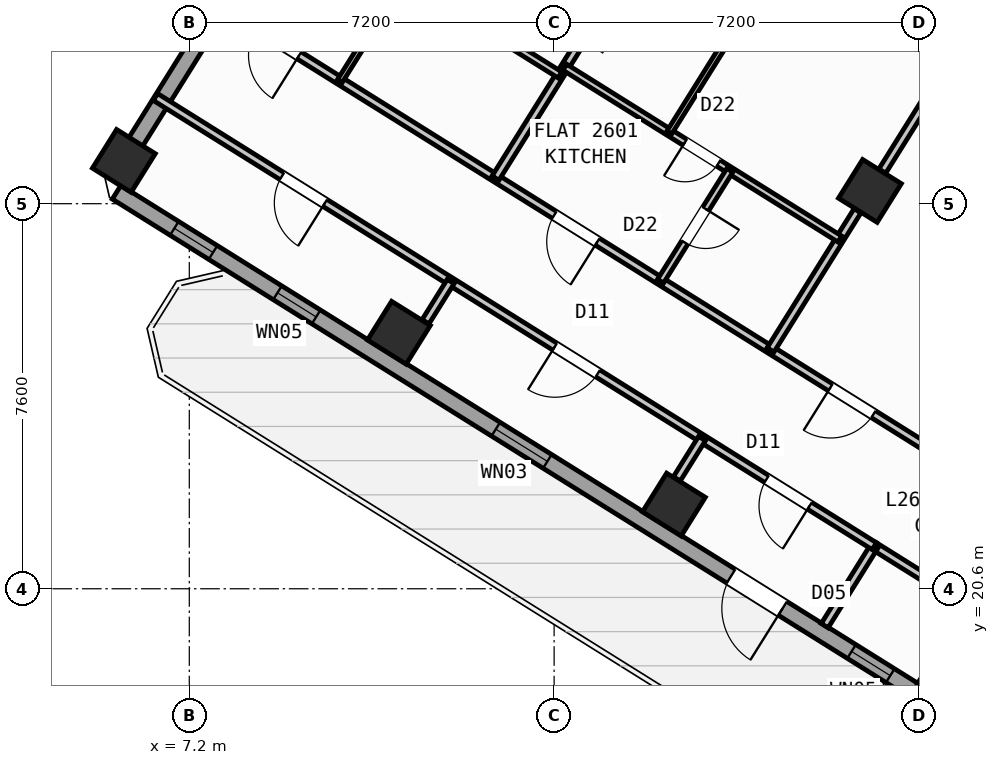
"""IFC4 building model, lengths in metres.
Left out: names, types, materials, properties, quantities, classifications, styles, units other than length and angle.
Written with IfcOpenShell. Run it as: python <this file> out.ifc"""

import sys

from ifc_helpers import new_model, si_unit, direction, frame, frame_2d, origin, origin_2d, place, context, subcontext, project, spatial, rectangle, hollow_rectangle, extrude, source, transform, mapped, element, fill, save


model = new_model("IFC4")
c1 = context("Model", 3, precision=1e-05, world=origin(), true_north=direction((0.0, 1.0)))
c2 = subcontext(c1, "Body", "Model", "MODEL_VIEW")
j1 = project(units=[si_unit("LENGTHUNIT", "METRE"), si_unit("PLANEANGLEUNIT", "RADIAN")], contexts=[c1])
p1 = place(None, origin())
s1 = spatial("IfcSite", under=j1, at=p1, CompositionType="ELEMENT")
p2 = place(p1, origin())
s2 = spatial("IfcBuilding", under=s1, at=p2, CompositionType="ELEMENT")
p3 = place(p2, frame((0.0, 0.0, 105.3)))
s3 = spatial("IfcBuildingStorey", under=s2, at=p3, CompositionType="ELEMENT", Elevation=105.3)
m1 = source(origin(), c2, "Body", "SweptSolid", [
    extrude(hollow_rectangle(XDim=0.9, YDim=0.9, WallThickness=0.036, at=origin_2d()), origin(), (0.0, 0.0, 1.0), 3.6),
])
for number, where, z_axis, x_axis in (
    (1, (22.191, 18.87, 0.0), (0.0, 0.0, 1.0), (-0.848, 0.53, 0.0)),
    (2, (20.632, 28.452, 0.0), (0.0, 0.0, 1.0), (-0.848, 0.53, 0.0)),
    (3, (16.764, 22.261, 0.0), (0.0, 0.0, 1.0), (-0.848, 0.53, 0.0)),
    (4, (11.336, 25.653, 0.0), (0.0, 0.0, 1.0), (-0.848, 0.53, 0.0)),
    (5, (5.909, 29.044, 0.0), (0.0, 0.0, 1.0), (-0.848, 0.53, 0.0)),
):
    element("IfcColumn", number, at=place(p3, frame(where, z_axis=z_axis, x_axis=x_axis)), inside=s3, PredefinedType="COLUMN", context=c2, shape_type="MappedRepresentation", body=[
        mapped(m1, transform((0.0, 0.0, 0.0), scale=1.0)),
    ])
p4 = place(p3, frame((31.76, 12.183, 0.0), z_axis=(0.0, 0.0, 1.0), x_axis=(-0.848047074256, 0.529920899612, 0.0)))
e6 = element("IfcWall", 6, at=p4, inside=s3, PredefinedType="STANDARD", context=c2, shape_type="SweptSolid", body=[
    extrude(rectangle(XDim=30.652, YDim=0.32, at=frame_2d((15.326, 0.0))), origin(), (0.0, 0.0, 1.0), 3.35),
])
p5 = place(p4, frame((15.153, 0.0, 0.0)))
e7 = element("IfcOpeningElement", 7, at=p5, cuts=e6, PredefinedType="OPENING", context=c2, shape_type="SweptSolid", body=[
    extrude(rectangle(XDim=1.2, YDim=2.15, at=frame_2d((0.6, 1.075))), frame((0.0, 0.17, 0.0), z_axis=(0.0, -1.0, 0.0), x_axis=(1.0, 0.0, 0.0)), (0.0, 0.0, 1.0), 0.34),
])
p6 = place(p4, frame((2.002, 0.0, 0.8)))
e8 = element("IfcOpeningElement", 8, at=p6, cuts=e6, PredefinedType="OPENING", context=c2, shape_type="SweptSolid", body=[
    extrude(rectangle(XDim=2.1, YDim=1.55, at=frame_2d((1.05, 0.775))), frame((0.0, 0.17, 0.0), z_axis=(0.0, -1.0, 0.0), x_axis=(1.0, 0.0, 0.0)), (0.0, 0.0, 1.0), 0.34),
])
p7 = place(p4, frame((7.206, 0.0, 0.8)))
e9 = element("IfcOpeningElement", 9, at=p7, cuts=e6, PredefinedType="OPENING", context=c2, shape_type="SweptSolid", body=[
    extrude(rectangle(XDim=2.1, YDim=1.55, at=frame_2d((1.05, 0.775))), frame((0.0, 0.17, 0.0), z_axis=(0.0, -1.0, 0.0), x_axis=(1.0, 0.0, 0.0)), (0.0, 0.0, 1.0), 0.34),
])
p8 = place(p4, frame((12.648, 0.0, 1.0)))
e10 = element("IfcOpeningElement", 10, at=p8, cuts=e6, PredefinedType="OPENING", context=c2, shape_type="SweptSolid", body=[
    extrude(rectangle(XDim=0.9, YDim=1.25, at=frame_2d((0.45, 0.625))), frame((0.0, 0.17, 0.0), z_axis=(0.0, -1.0, 0.0), x_axis=(1.0, 0.0, 0.0)), (0.0, 0.0, 1.0), 0.34),
])
p9 = place(p4, frame((20.628, 0.0, 0.95)))
e11 = element("IfcOpeningElement", 11, at=p9, cuts=e6, PredefinedType="OPENING", context=c2, shape_type="SweptSolid", body=[
    extrude(rectangle(XDim=1.2, YDim=1.4, at=frame_2d((0.6, 0.7))), frame((0.0, 0.17, 0.0), z_axis=(0.0, -1.0, 0.0), x_axis=(1.0, 0.0, 0.0)), (0.0, 0.0, 1.0), 0.34),
])
p10 = place(p4, frame((26.008, 0.0, 1.0)))
e12 = element("IfcOpeningElement", 12, at=p10, cuts=e6, PredefinedType="OPENING", context=c2, shape_type="SweptSolid", body=[
    extrude(rectangle(XDim=0.9, YDim=1.25, at=frame_2d((0.45, 0.625))), frame((0.0, 0.17, 0.0), z_axis=(0.0, -1.0, 0.0), x_axis=(1.0, 0.0, 0.0)), (0.0, 0.0, 1.0), 0.34),
])
p11 = place(p4, frame((28.408, 0.0, 1.0)))
e13 = element("IfcOpeningElement", 13, at=p11, cuts=e6, PredefinedType="OPENING", context=c2, shape_type="SweptSolid", body=[
    extrude(rectangle(XDim=0.9, YDim=1.25, at=frame_2d((0.45, 0.625))), frame((0.0, 0.17, 0.0), z_axis=(0.0, -1.0, 0.0), x_axis=(1.0, 0.0, 0.0)), (0.0, 0.0, 1.0), 0.34),
])
p12 = place(p3, frame((5.7, 28.71, 0.0), z_axis=(0.0, 0.0, 1.0), x_axis=(0.529923711467, 0.8480453172, 0.0)))
e14 = element("IfcWall", 14, at=p12, inside=s3, PredefinedType="STANDARD", context=c2, shape_type="SweptSolid", body=[
    extrude(rectangle(XDim=21.587, YDim=0.32, at=frame_2d((10.794, 0.0))), origin(), (0.0, 0.0, 1.0), 2.775),
])
p13 = place(p12, frame((4.749, 0.0, 1.0)))
e15 = element("IfcOpeningElement", 15, at=p13, cuts=e14, PredefinedType="OPENING", context=c2, shape_type="SweptSolid", body=[
    extrude(rectangle(XDim=0.9, YDim=1.25, at=frame_2d((0.45, 0.625))), frame((0.0, 0.17, 0.0), z_axis=(0.0, -1.0, 0.0), x_axis=(1.0, 0.0, 0.0)), (0.0, 0.0, 1.0), 0.34),
])
p14 = place(p12, frame((10.444, 0.0, 0.85)))
e16 = element("IfcOpeningElement", 16, at=p14, cuts=e14, PredefinedType="OPENING", context=c2, shape_type="SweptSolid", body=[
    extrude(rectangle(XDim=1.8, YDim=1.5, at=frame_2d((0.9, 0.75))), frame((0.0, 0.17, 0.0), z_axis=(0.0, -1.0, 0.0), x_axis=(1.0, 0.0, 0.0)), (0.0, 0.0, 1.0), 0.34),
])
p15 = place(p12, frame((17.406, 0.0, 0.85)))
e17 = element("IfcOpeningElement", 17, at=p15, cuts=e14, PredefinedType="OPENING", context=c2, shape_type="SweptSolid", body=[
    extrude(rectangle(XDim=1.5, YDim=1.5, at=frame_2d((0.75, 0.75))), frame((0.0, 0.17, 0.0), z_axis=(0.0, -1.0, 0.0), x_axis=(1.0, 0.0, 0.0)), (0.0, 0.0, 1.0), 0.34),
])
p16 = place(p3, frame((22.677, 20.217, 0.0), z_axis=(0.0, 0.0, 1.0), x_axis=(-0.848057719594, 0.529903863203, 0.0)))
e18 = element("IfcWall", 18, at=p16, inside=s3, PredefinedType="PARTITIONING", context=c2, shape_type="SweptSolid", body=[
    extrude(rectangle(XDim=2.308, YDim=0.16, at=frame_2d((1.154, 0.0))), origin(), (0.0, 0.0, 1.0), 3.34),
])
p17 = place(p3, frame((20.719, 21.44, 0.0), z_axis=(0.0, 0.0, 1.0), x_axis=(-0.529880305451, -0.848072439061, 0.0)))
e19 = element("IfcWall", 19, at=p17, inside=s3, PredefinedType="PARTITIONING", context=c2, shape_type="SweptSolid", body=[
    extrude(rectangle(XDim=1.85, YDim=0.16, at=frame_2d((0.925, 0.0))), origin(), (0.0, 0.0, 1.0), 3.34),
])
p18 = place(p3, frame((21.885, 23.306, 0.0), z_axis=(0.0, 0.0, 1.0), x_axis=(-0.848052408131, 0.529912363569, 0.0)))
e20 = element("IfcWall", 20, at=p18, inside=s3, PredefinedType="PARTITIONING", context=c2, shape_type="SweptSolid", body=[
    extrude(rectangle(XDim=16.73, YDim=0.16, at=frame_2d((8.365, 0.0))), origin(), (0.0, 0.0, 1.0), 3.34),
])
p19 = place(p18, frame((1.395, 0.0, 0.0)))
e21 = element("IfcOpeningElement", 21, at=p19, cuts=e20, PredefinedType="OPENING", context=c2, shape_type="SweptSolid", body=[
    extrude(rectangle(XDim=1.0, YDim=2.1, at=frame_2d((0.5, 1.05))), frame((0.0, 0.09, 0.0), z_axis=(0.0, -1.0, 0.0), x_axis=(1.0, 0.0, 0.0)), (0.0, 0.0, 1.0), 0.18),
])
p20 = place(p18, frame((7.82, 0.0, 0.0)))
e22 = element("IfcOpeningElement", 22, at=p20, cuts=e20, PredefinedType="OPENING", context=c2, shape_type="SweptSolid", body=[
    extrude(rectangle(XDim=1.0, YDim=2.1, at=frame_2d((0.5, 1.05))), frame((0.0, 0.09, 0.0), z_axis=(0.0, -1.0, 0.0), x_axis=(1.0, 0.0, 0.0)), (0.0, 0.0, 1.0), 0.18),
])
p21 = place(p18, frame((14.76, 0.0, 0.0)))
e23 = element("IfcOpeningElement", 23, at=p21, cuts=e20, PredefinedType="OPENING", context=c2, shape_type="SweptSolid", body=[
    extrude(rectangle(XDim=1.0, YDim=2.1, at=frame_2d((0.5, 1.05))), frame((0.0, 0.09, 0.0), z_axis=(0.0, -1.0, 0.0), x_axis=(1.0, 0.0, 0.0)), (0.0, 0.0, 1.0), 0.18),
])
p22 = place(p3, frame((20.719, 21.44, 0.0), z_axis=(0.0, 0.0, 1.0), x_axis=(-0.848048310262, 0.529918921593, 0.0)))
e24 = element("IfcWall", 24, at=p22, inside=s3, PredefinedType="PARTITIONING", context=c2, shape_type="SweptSolid", body=[
    extrude(rectangle(XDim=16.73, YDim=0.16, at=frame_2d((8.365, 0.0))), origin(), (0.0, 0.0, 1.0), 3.34),
])
p23 = place(p22, frame((1.505, 0.0, 0.0)))
e25 = element("IfcOpeningElement", 25, at=p23, cuts=e24, PredefinedType="OPENING", context=c2, shape_type="SweptSolid", body=[
    extrude(rectangle(XDim=1.0, YDim=2.1, at=frame_2d((0.5, 1.05))), frame((0.0, 0.09, 0.0), z_axis=(0.0, -1.0, 0.0), x_axis=(1.0, 0.0, 0.0)), (0.0, 0.0, 1.0), 0.18),
])
p24 = place(p22, frame((6.435, 0.0, 0.0)))
e26 = element("IfcOpeningElement", 26, at=p24, cuts=e24, PredefinedType="OPENING", context=c2, shape_type="SweptSolid", body=[
    extrude(rectangle(XDim=1.0, YDim=2.1, at=frame_2d((0.5, 1.05))), frame((0.0, 0.09, 0.0), z_axis=(0.0, -1.0, 0.0), x_axis=(1.0, 0.0, 0.0)), (0.0, 0.0, 1.0), 0.18),
])
p25 = place(p22, frame((12.784, 0.0, 0.0)))
e27 = element("IfcOpeningElement", 27, at=p25, cuts=e24, PredefinedType="OPENING", context=c2, shape_type="SweptSolid", body=[
    extrude(rectangle(XDim=1.0, YDim=2.1, at=frame_2d((0.5, 1.05))), frame((0.0, 0.09, 0.0), z_axis=(0.0, -1.0, 0.0), x_axis=(1.0, 0.0, 0.0)), (0.0, 0.0, 1.0), 0.18),
])
p26 = place(p3, frame((17.319, 23.565, 0.0), z_axis=(0.0, 0.0, 1.0), x_axis=(-0.529952145338, -0.848027548876, 0.0)))
e28 = element("IfcWall", 28, at=p26, inside=s3, PredefinedType="PARTITIONING", context=c2, shape_type="SweptSolid", body=[
    extrude(rectangle(XDim=0.938, YDim=0.16, at=frame_2d((0.469, 0.0))), origin(), (0.0, 0.0, 1.0), 2.775),
])
p27 = place(p3, frame((12.359, 26.665, 0.0), z_axis=(0.0, 0.0, 1.0), x_axis=(-0.529835187763, -0.848100627171, 0.0)))
e29 = element("IfcWall", 29, at=p27, inside=s3, PredefinedType="PARTITIONING", context=c2, shape_type="SweptSolid", body=[
    extrude(rectangle(XDim=0.938, YDim=0.16, at=frame_2d((0.469, 0.0))), origin(), (0.0, 0.0, 1.0), 3.34),
])
p28 = place(p3, frame((24.256, 34.251, 0.0), z_axis=(0.0, 0.0, 1.0), x_axis=(-0.529919772691, -0.848047778437, 0.0)))
e30 = element("IfcWall", 30, at=p28, inside=s3, PredefinedType="PARTITIONING", context=c2, shape_type="SweptSolid", body=[
    extrude(rectangle(XDim=6.376, YDim=0.16, at=frame_2d((3.188, 0.0))), origin(), (0.0, 0.0, 1.0), 2.775),
])
p29 = place(p3, frame((20.387, 28.06, 0.0), z_axis=(0.0, 0.0, 1.0), x_axis=(-0.529890499457, -0.848066069705, 0.0)))
e31 = element("IfcWall", 31, at=p29, inside=s3, PredefinedType="PARTITIONING", context=c2, shape_type="SweptSolid", body=[
    extrude(rectangle(XDim=3.238, YDim=0.16, at=frame_2d((1.619, 0.0))), origin(), (0.0, 0.0, 1.0), 2.775),
])
p30 = place(p3, frame((14.96, 31.452, 0.0), z_axis=(0.0, 0.0, 1.0), x_axis=(-0.529924383291, -0.848044897393, 0.0)))
e32 = element("IfcWall", 32, at=p30, inside=s3, PredefinedType="PARTITIONING", context=c2, shape_type="SweptSolid", body=[
    extrude(rectangle(XDim=3.238, YDim=0.16, at=frame_2d((1.619, 0.0))), origin(), (0.0, 0.0, 1.0), 2.775),
])
p31 = place(p3, frame((20.039, 27.502, 0.0), z_axis=(0.0, 0.0, 1.0), x_axis=(-0.848039019877, 0.529933789039, 0.0)))
e33 = element("IfcWall", 33, at=p31, inside=s3, PredefinedType="PLUMBINGWALL", context=c2, shape_type="SweptSolid", body=[
    extrude(rectangle(XDim=6.4, YDim=0.14, at=frame_2d((3.2, 0.0))), origin(), (0.0, 0.0, 1.0), 3.34),
])
p32 = place(p31, frame((2.824, 0.0, 0.0)))
e34 = element("IfcOpeningElement", 34, at=p32, cuts=e33, PredefinedType="OPENING", context=c2, shape_type="SweptSolid", body=[
    extrude(rectangle(XDim=0.78, YDim=2.05, at=frame_2d((0.39, 1.025))), frame((0.0, 0.08, 0.0), z_axis=(0.0, -1.0, 0.0), x_axis=(1.0, 0.0, 0.0)), (0.0, 0.0, 1.0), 0.16),
])
p33 = place(p3, frame((17.867, 28.859, 0.0), z_axis=(0.0, 0.0, 1.0), x_axis=(-0.529913878929, -0.848051461244, 0.0)))
e35 = element("IfcWall", 35, at=p33, inside=s3, PredefinedType="PLUMBINGWALL", context=c2, shape_type="SweptSolid", body=[
    extrude(rectangle(XDim=2.58, YDim=0.14, at=frame_2d((1.29, 0.0))), origin(), (0.0, 0.0, 1.0), 3.34),
])
p34 = place(p33, frame((0.9, 0.0, 0.0)))
e36 = element("IfcOpeningElement", 36, at=p34, cuts=e35, PredefinedType="OPENING", context=c2, shape_type="SweptSolid", body=[
    extrude(rectangle(XDim=0.78, YDim=2.05, at=frame_2d((0.39, 1.025))), frame((0.0, 0.08, 0.0), z_axis=(0.0, -1.0, 0.0), x_axis=(1.0, 0.0, 0.0)), (0.0, 0.0, 1.0), 0.16),
])
p35 = place(p3, frame((24.802, 42.614, 0.0), z_axis=(0.0, 0.0, 1.0), x_axis=(-0.529928839727, -0.848042112649, 0.0)))
e37 = element("IfcWall", 37, at=p35, inside=s3, PredefinedType="PARTITIONING", context=c2, shape_type="SweptSolid", body=[
    extrude(rectangle(XDim=15.34, YDim=0.11, at=frame_2d((7.67, 0.0))), origin(), (0.0, 0.0, 1.0), 3.34),
])
p36 = place(p35, frame((0.47, 0.0, 0.0)))
e38 = element("IfcOpeningElement", 38, at=p36, cuts=e37, PredefinedType="OPENING", context=c2, shape_type="SweptSolid", body=[
    extrude(rectangle(XDim=0.92, YDim=2.08, at=frame_2d((0.46, 1.04))), frame((0.0, 0.065, 0.0), z_axis=(0.0, -1.0, 0.0), x_axis=(1.0, 0.0, 0.0)), (0.0, 0.0, 1.0), 0.13),
])
p37 = place(p3, frame((19.67, 45.821, 0.0), z_axis=(0.0, 0.0, 1.0), x_axis=(-0.529916887708, -0.848049581169, 0.0)))
e39 = element("IfcWall", 39, at=p37, inside=s3, PredefinedType="PARTITIONING", context=c2, shape_type="SweptSolid", body=[
    extrude(rectangle(XDim=17.92, YDim=0.11, at=frame_2d((8.96, 0.0))), origin(), (0.0, 0.0, 1.0), 3.34),
])
p38 = place(p37, frame((16.28, 0.0, 0.0)))
e40 = element("IfcOpeningElement", 40, at=p38, cuts=e39, PredefinedType="OPENING", context=c2, shape_type="SweptSolid", body=[
    extrude(rectangle(XDim=0.78, YDim=2.05, at=frame_2d((0.39, 1.025))), frame((0.0, 0.065, 0.0), z_axis=(0.0, -1.0, 0.0), x_axis=(1.0, 0.0, 0.0)), (0.0, 0.0, 1.0), 0.13),
])
p39 = place(p37, frame((10.711, 0.0, 0.0)))
e41 = element("IfcOpeningElement", 41, at=p39, cuts=e39, PredefinedType="OPENING", context=c2, shape_type="SweptSolid", body=[
    extrude(rectangle(XDim=0.92, YDim=2.08, at=frame_2d((0.46, 1.04))), frame((0.0, 0.065, 0.0), z_axis=(0.0, -1.0, 0.0), x_axis=(1.0, 0.0, 0.0)), (0.0, 0.0, 1.0), 0.13),
])
p40 = place(p3, frame((14.516, 30.741, 0.0), z_axis=(0.0, 0.0, 1.0), x_axis=(-0.848051346257, 0.52991406295, 0.0)))
e42 = element("IfcWall", 42, at=p40, inside=s3, PredefinedType="PLUMBINGWALL", context=c2, shape_type="SweptSolid", body=[
    extrude(rectangle(XDim=3.62, YDim=0.14, at=frame_2d((1.81, 0.0))), origin(), (0.0, 0.0, 1.0), 3.34),
])
m2 = source(origin(), c2, "Body", "SweptSolid", [
    extrude(rectangle(XDim=1.2, YDim=2.15, at=frame_2d((0.6, 1.075))), frame((0.0, 0.025, 0.0), z_axis=(0.0, -1.0, 0.0), x_axis=(1.0, 0.0, 0.0)), (0.0, 0.0, 1.0), 0.05),
])
p41 = place(p5, origin())
e43 = element("IfcDoor", 43, at=p41, inside=s3, OperationType="SINGLE_SWING_LEFT", PredefinedType="DOOR", context=c2, shape_type="MappedRepresentation", body=[
    mapped(m2, transform((0.0, 0.0, 0.0), scale=1.0)),
])
fill(e7, e43)
m3 = source(origin(), c2, "Body", "SweptSolid", [
    extrude(rectangle(XDim=0.9, YDim=1.25, at=frame_2d((0.45, 0.625))), frame((0.0, 0.03, 0.0), z_axis=(0.0, -1.0, 0.0), x_axis=(1.0, 0.0, 0.0)), (0.0, 0.0, 1.0), 0.06),
])
p42 = place(p8, origin())
e44 = element("IfcWindow", 44, at=p42, inside=s3, PartitioningType="SINGLE_PANEL", PredefinedType="WINDOW", context=c2, shape_type="MappedRepresentation", body=[
    mapped(m3, transform((0.0, 0.0, 0.0), scale=1.0)),
])
fill(e10, e44)
m4 = source(origin(), c2, "Body", "SweptSolid", [
    extrude(rectangle(XDim=1.2, YDim=1.4, at=frame_2d((0.6, 0.7))), frame((0.0, 0.03, 0.0), z_axis=(0.0, -1.0, 0.0), x_axis=(1.0, 0.0, 0.0)), (0.0, 0.0, 1.0), 0.06),
])
p43 = place(p9, origin())
e45 = element("IfcWindow", 45, at=p43, inside=s3, PartitioningType="SINGLE_PANEL", PredefinedType="WINDOW", context=c2, shape_type="MappedRepresentation", body=[
    mapped(m4, transform((0.0, 0.0, 0.0), scale=1.0)),
])
fill(e11, e45)
p44 = place(p10, origin())
e46 = element("IfcWindow", 46, at=p44, inside=s3, PartitioningType="SINGLE_PANEL", PredefinedType="WINDOW", context=c2, shape_type="MappedRepresentation", body=[
    mapped(m3, transform((0.0, 0.0, 0.0), scale=1.0)),
])
fill(e12, e46)
p45 = place(p11, origin())
e47 = element("IfcWindow", 47, at=p45, inside=s3, PartitioningType="SINGLE_PANEL", PredefinedType="WINDOW", context=c2, shape_type="MappedRepresentation", body=[
    mapped(m3, transform((0.0, 0.0, 0.0), scale=1.0)),
])
fill(e13, e47)
m5 = source(origin(), c2, "Body", "SweptSolid", [
    extrude(rectangle(XDim=1.0, YDim=2.1, at=frame_2d((0.5, 1.05))), frame((0.0, 0.025, 0.0), z_axis=(0.0, -1.0, 0.0), x_axis=(1.0, 0.0, 0.0)), (0.0, 0.0, 1.0), 0.05),
])
p46 = place(p23, origin())
e48 = element("IfcDoor", 48, at=p46, inside=s3, OperationType="SINGLE_SWING_LEFT", PredefinedType="DOOR", context=c2, shape_type="MappedRepresentation", body=[
    mapped(m5, transform((0.0, 0.0, 0.0), scale=1.0)),
])
fill(e25, e48)
p47 = place(p24, origin())
e49 = element("IfcDoor", 49, at=p47, inside=s3, OperationType="SINGLE_SWING_RIGHT", PredefinedType="DOOR", context=c2, shape_type="MappedRepresentation", body=[
    mapped(m5, transform((0.0, 0.0, 0.0), scale=1.0)),
])
fill(e26, e49)
p48 = place(p25, origin())
e50 = element("IfcDoor", 50, at=p48, inside=s3, OperationType="SINGLE_SWING_LEFT", PredefinedType="DOOR", context=c2, shape_type="MappedRepresentation", body=[
    mapped(m5, transform((0.0, 0.0, 0.0), scale=1.0)),
])
fill(e27, e50)
p49 = place(p19, origin())
e51 = element("IfcDoor", 51, at=p49, inside=s3, OperationType="SINGLE_SWING_RIGHT", PredefinedType="DOOR", context=c2, shape_type="MappedRepresentation", body=[
    mapped(m5, transform((0.0, 0.0, 0.0), scale=1.0)),
])
fill(e21, e51)
p50 = place(p20, origin())
e52 = element("IfcDoor", 52, at=p50, inside=s3, OperationType="SINGLE_SWING_LEFT", PredefinedType="DOOR", context=c2, shape_type="MappedRepresentation", body=[
    mapped(m5, transform((0.0, 0.0, 0.0), scale=1.0)),
])
fill(e22, e52)
m6 = source(origin(), c2, "Body", "SweptSolid", [
    extrude(rectangle(XDim=0.78, YDim=2.05, at=frame_2d((0.39, 1.025))), frame((0.0, 0.025, 0.0), z_axis=(0.0, -1.0, 0.0), x_axis=(1.0, 0.0, 0.0)), (0.0, 0.0, 1.0), 0.05),
])
p51 = place(p32, origin())
e53 = element("IfcDoor", 53, at=p51, inside=s3, OperationType="SINGLE_SWING_RIGHT", PredefinedType="DOOR", context=c2, shape_type="MappedRepresentation", body=[
    mapped(m6, transform((0.0, 0.0, 0.0), scale=1.0)),
])
fill(e34, e53)
p52 = place(p34, origin())
e54 = element("IfcDoor", 54, at=p52, inside=s3, OperationType="SINGLE_SWING_LEFT", PredefinedType="DOOR", context=c2, shape_type="MappedRepresentation", body=[
    mapped(m6, transform((0.0, 0.0, 0.0), scale=1.0)),
])
fill(e36, e54)
p53 = place(p21, origin())
e55 = element("IfcDoor", 55, at=p53, inside=s3, OperationType="SINGLE_SWING_LEFT", PredefinedType="DOOR", context=c2, shape_type="MappedRepresentation", body=[
    mapped(m5, transform((0.0, 0.0, 0.0), scale=1.0)),
])
fill(e23, e55)
save(model, sys.argv[1])
